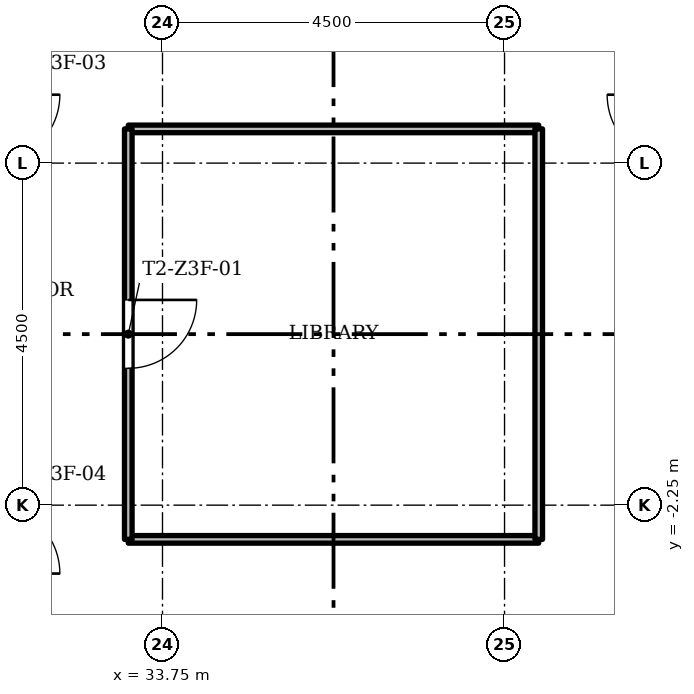
"""IFC4 building model, lengths in metres.
Left out: names, types, materials, properties, quantities, classifications, styles, units other than length and angle.
Written with IfcOpenShell. Run it as: python <this file> out.ifc"""

import sys

from ifc_helpers import new_model, si_unit, direction, frame, frame_2d, origin, place, context, subcontext, project, spatial, rectangle, extrude, element, fill, save


model = new_model("IFC4")
c1 = context("Model", 3, precision=1e-05, world=origin(), true_north=direction((0.0, 1.0)))
c2 = subcontext(c1, "Body", "Model", "MODEL_VIEW")
j1 = project(units=[si_unit("LENGTHUNIT", "METRE"), si_unit("PLANEANGLEUNIT", "RADIAN")], contexts=[c1])
p1 = place(None, origin())
s1 = spatial("IfcSite", under=j1, at=p1, CompositionType="ELEMENT")
p2 = place(p1, origin())
s2 = spatial("IfcBuilding", under=s1, at=p2, CompositionType="ELEMENT")
p3 = place(p2, frame((0.0, 0.0, 164.3)))
s3 = spatial("IfcBuildingStorey", under=s2, at=p3, CompositionType="ELEMENT", Elevation=164.3)
for number, where, z_axis, x_axis in (
    (1, (38.7, -2.7, 0.0), (0.0, 0.0, 1.0), (-1.0, 0.0, 0.0)),
    (2, (38.7, 2.7, 0.0), (0.0, 0.0, 1.0), (-1.0, 0.0, 0.0)),
    (3, (38.7, -2.7, 0.0), (0.0, 0.0, 1.0), (0.0, 1.0, 0.0)),
):
    element("IfcWall", number, at=place(p3, frame(where, z_axis=z_axis, x_axis=x_axis)), inside=s3, PredefinedType="PARTITIONING", context=c2, shape_type="SweptSolid", body=[
        extrude(rectangle(XDim=5.4, YDim=0.1, at=frame_2d((2.7, 0.0))), origin(), (0.0, 0.0, 1.0), 3.0),
    ])
p4 = place(p3, frame((33.3, -2.7, 0.0), z_axis=(0.0, 0.0, 1.0), x_axis=(0.0, 1.0, 0.0)))
e4 = element("IfcWall", 4, at=p4, inside=s3, PredefinedType="PARTITIONING", context=c2, shape_type="SweptSolid", body=[
    extrude(rectangle(XDim=5.4, YDim=0.1, at=frame_2d((2.7, 0.0))), origin(), (0.0, 0.0, 1.0), 3.0),
])
p5 = place(p4, frame((2.25, 0.0, 0.0)))
e5 = element("IfcOpeningElement", 5, at=p5, cuts=e4, PredefinedType="OPENING", context=c2, shape_type="SweptSolid", body=[
    extrude(rectangle(XDim=0.9, YDim=2.1, at=frame_2d((0.45, 1.05))), frame((0.0, 0.06, 0.0), z_axis=(0.0, -1.0, 0.0), x_axis=(1.0, 0.0, 0.0)), (0.0, 0.0, 1.0), 0.12),
])
p6 = place(p5, origin())
e6 = element("IfcDoor", 6, at=p6, inside=s3, OperationType="SINGLE_SWING_RIGHT", PredefinedType="DOOR", context=c2, shape_type="SweptSolid", body=[
    extrude(rectangle(XDim=0.9, YDim=2.1, at=frame_2d((0.45, 1.05))), frame((0.0, 0.025, 0.0), z_axis=(0.0, -1.0, 0.0), x_axis=(1.0, 0.0, 0.0)), (0.0, 0.0, 1.0), 0.05),
])
fill(e5, e6)
save(model, sys.argv[1])
